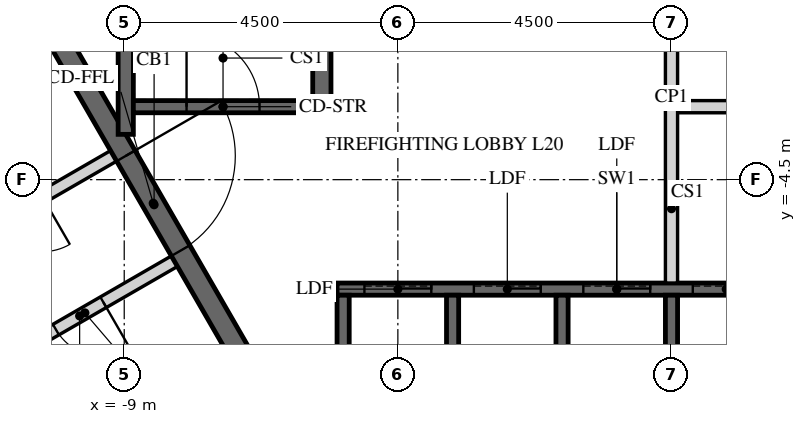
"""IFC4 building model, lengths in metres.
Left out: names, types, materials, properties, quantities, classifications, styles, units other than length and angle.
Written with IfcOpenShell. Run it as: python <this file> out.ifc"""

import sys

from ifc_helpers import new_model, si_unit, direction, frame, frame_2d, origin, place, context, subcontext, project, spatial, polyline, rectangle, outline, extrude, element, fill, save


model = new_model("IFC4")
c1 = context("Model", 3, precision=1e-05, world=origin(), true_north=direction((0.0, 1.0)))
c2 = subcontext(c1, "Body", "Model", "MODEL_VIEW")
j1 = project(units=[si_unit("LENGTHUNIT", "METRE"), si_unit("PLANEANGLEUNIT", "RADIAN")], contexts=[c1])
p1 = place(None, origin())
s1 = spatial("IfcSite", under=j1, at=p1, CompositionType="ELEMENT")
p2 = place(p1, origin())
s2 = spatial("IfcBuilding", under=s1, at=p2, CompositionType="ELEMENT")
p3 = place(p2, frame((0.0, 0.0, 92.1)))
s3 = spatial("IfcBuildingStorey", under=s2, at=p3, CompositionType="ELEMENT", Elevation=92.1)
p4 = place(p3, frame((-15.819, 0.0, -0.15), z_axis=(0.0, 0.0, 1.0), x_axis=(0.499999880136, -0.866025472988, 0.0)))
e1 = element("IfcWall", 1, at=p4, inside=s3, PredefinedType="SHEAR", context=c2, shape_type="SweptSolid", body=[
    extrude(outline(polyline([(-0.173, -0.3), (15.993, -0.3), (15.646, 0.3), (0.173, 0.3), (-0.173, -0.3)])), origin(), (0.0, 0.0, 1.0), 3.9),
])
p5 = place(p4, frame((6.981, 0.0, 0.15)))
e2 = element("IfcOpeningElement", 2, at=p5, cuts=e1, PredefinedType="OPENING", context=c2, shape_type="SweptSolid", body=[
    extrude(rectangle(XDim=1.8, YDim=2.4, at=frame_2d((0.9, 1.2))), frame((0.0, 0.31, 0.0), z_axis=(0.0, -1.0, 0.0), x_axis=(1.0, 0.0, 0.0)), (0.0, 0.0, 1.0), 0.62),
])
p6 = place(p3, frame((-11.345, 0.0, -0.15), z_axis=(0.0, 0.0, 1.0), x_axis=(0.499995046907, -0.866028263435, 0.0)))
e3 = element("IfcWall", 3, at=p6, inside=s3, PredefinedType="SHEAR", context=c2, shape_type="SweptSolid", body=[
    extrude(outline(polyline([(-0.101, -0.175), (11.446, -0.175), (11.244, 0.175), (0.101, 0.175), (-0.101, -0.175)])), origin(), (0.0, 0.0, 1.0), 3.9),
])
p7 = place(p6, frame((4.744, 0.0, 0.15)))
e4 = element("IfcOpeningElement", 4, at=p7, cuts=e3, PredefinedType="OPENING", context=c2, shape_type="SweptSolid", body=[
    extrude(rectangle(XDim=1.8, YDim=2.4, at=frame_2d((0.9, 1.2))), frame((0.0, 0.185, 0.0), z_axis=(0.0, -1.0, 0.0), x_axis=(1.0, 0.0, 0.0)), (0.0, 0.0, 1.0), 0.37),
])
p8 = place(p3, frame((-5.5, -6.3, -0.25), z_axis=(0.0, 0.0, 1.0), x_axis=(1.0, 0.0, 0.0)))
e5 = element("IfcWall", 5, at=p8, inside=s3, PredefinedType="SHEAR", context=c2, shape_type="SweptSolid", body=[
    extrude(rectangle(XDim=9.2, YDim=0.2, at=frame_2d((4.6, 0.0))), origin(), (0.0, 0.0, 1.0), 3.9),
])
p9 = place(p8, frame((0.45, 0.0, 0.25)))
e6 = element("IfcOpeningElement", 6, at=p9, cuts=e5, PredefinedType="OPENING", context=c2, shape_type="SweptSolid", body=[
    extrude(rectangle(XDim=1.1, YDim=2.1, at=frame_2d((0.55, 1.05))), frame((0.0, 0.11, 0.0), z_axis=(0.0, -1.0, 0.0), x_axis=(1.0, 0.0, 0.0)), (0.0, 0.0, 1.0), 0.22),
])
p10 = place(p8, frame((2.25, 0.0, 0.25)))
e7 = element("IfcOpeningElement", 7, at=p10, cuts=e5, PredefinedType="OPENING", context=c2, shape_type="SweptSolid", body=[
    extrude(rectangle(XDim=1.1, YDim=2.1, at=frame_2d((0.55, 1.05))), frame((0.0, 0.11, 0.0), z_axis=(0.0, -1.0, 0.0), x_axis=(1.0, 0.0, 0.0)), (0.0, 0.0, 1.0), 0.22),
])
p11 = place(p8, frame((4.05, 0.0, 0.25)))
e8 = element("IfcOpeningElement", 8, at=p11, cuts=e5, PredefinedType="OPENING", context=c2, shape_type="SweptSolid", body=[
    extrude(rectangle(XDim=1.1, YDim=2.1, at=frame_2d((0.55, 1.05))), frame((0.0, 0.11, 0.0), z_axis=(0.0, -1.0, 0.0), x_axis=(1.0, 0.0, 0.0)), (0.0, 0.0, 1.0), 0.22),
])
p12 = place(p8, frame((5.85, 0.0, 0.25)))
e9 = element("IfcOpeningElement", 9, at=p12, cuts=e5, PredefinedType="OPENING", context=c2, shape_type="SweptSolid", body=[
    extrude(rectangle(XDim=1.1, YDim=2.1, at=frame_2d((0.55, 1.05))), frame((0.0, 0.11, 0.0), z_axis=(0.0, -1.0, 0.0), x_axis=(1.0, 0.0, 0.0)), (0.0, 0.0, 1.0), 0.22),
])
p13 = place(p8, frame((7.65, 0.0, 0.25)))
e10 = element("IfcOpeningElement", 10, at=p13, cuts=e5, PredefinedType="OPENING", context=c2, shape_type="SweptSolid", body=[
    extrude(rectangle(XDim=1.1, YDim=2.1, at=frame_2d((0.55, 1.05))), frame((0.0, 0.11, 0.0), z_axis=(0.0, -1.0, 0.0), x_axis=(1.0, 0.0, 0.0)), (0.0, 0.0, 1.0), 0.22),
])
for number, where, z_axis, x_axis in (
    (11, (-5.4, -9.3, -0.25), (0.0, 0.0, 1.0), (0.0, 1.0, 0.0)),
    (12, (-3.6, -9.3, -0.25), (0.0, 0.0, 1.0), (0.0, 1.0, 0.0)),
    (13, (-1.8, -9.3, -0.25), (0.0, 0.0, 1.0), (0.0, 1.0, 0.0)),
    (14, (0.0, -9.3, -0.25), (0.0, 0.0, 1.0), (0.0, 1.0, 0.0)),
):
    element("IfcWall", number, at=place(p3, frame(where, z_axis=z_axis, x_axis=x_axis)), inside=s3, PredefinedType="SHEAR", context=c2, shape_type="SweptSolid", body=[
        extrude(rectangle(XDim=2.9, YDim=0.2, at=frame_2d((1.45, 0.0))), origin(), (0.0, 0.0, 1.0), 3.9),
    ])
p14 = place(p3, frame((0.1, -3.3, 0.0), z_axis=(0.0, 0.0, 1.0), x_axis=(1.0, 0.0, 0.0)))
e15 = element("IfcWall", 15, at=p14, inside=s3, PredefinedType="PARTITIONING", context=c2, shape_type="SweptSolid", body=[
    extrude(rectangle(XDim=5.5, YDim=0.2, at=frame_2d((2.75, 0.0))), origin(), (0.0, 0.0, 1.0), 3.65),
])
p15 = place(p14, frame((2.3, 0.0, 0.0)))
e16 = element("IfcOpeningElement", 16, at=p15, cuts=e15, PredefinedType="OPENING", context=c2, shape_type="SweptSolid", body=[
    extrude(rectangle(XDim=0.9, YDim=2.1, at=frame_2d((0.45, 1.05))), frame((0.0, 0.11, 0.0), z_axis=(0.0, -1.0, 0.0), x_axis=(1.0, 0.0, 0.0)), (0.0, 0.0, 1.0), 0.22),
])
p16 = place(p3, frame((0.0, -6.2, 0.0), z_axis=(0.0, 0.0, 1.0), x_axis=(0.0, 1.0, 0.0)))
e17 = element("IfcWall", 17, at=p16, inside=s3, PredefinedType="PARTITIONING", context=c2, shape_type="SweptSolid", body=[
    extrude(rectangle(XDim=6.1, YDim=0.2, at=frame_2d((3.05, 0.0))), origin(), (0.0, 0.0, 1.0), 3.65),
])
p17 = place(p3, frame((-8.175, -5.841, 0.0), z_axis=(0.0, 0.0, 1.0), x_axis=(-0.866020560687, -0.500008388397, 0.0)))
e18 = element("IfcWall", 18, at=p17, inside=s3, PredefinedType="PARTITIONING", context=c2, shape_type="SweptSolid", body=[
    extrude(rectangle(XDim=3.4, YDim=0.2, at=frame_2d((1.7, 0.0))), origin(), (0.0, 0.0, 1.0), 3.65),
])
p18 = place(p17, frame((1.35, 0.0, 0.0)))
e19 = element("IfcOpeningElement", 19, at=p18, cuts=e18, PredefinedType="OPENING", context=c2, shape_type="SweptSolid", body=[
    extrude(rectangle(XDim=0.9, YDim=2.1, at=frame_2d((0.45, 1.05))), frame((0.0, 0.11, 0.0), z_axis=(0.0, -1.0, 0.0), x_axis=(1.0, 0.0, 0.0)), (0.0, 0.0, 1.0), 0.22),
])
p19 = place(p3, frame((-9.175, -4.109, 0.0), z_axis=(0.0, 0.0, 1.0), x_axis=(-0.865989465428, -0.500062241894, 0.0)))
e20 = element("IfcWall", 20, at=p19, inside=s3, PredefinedType="PARTITIONING", context=c2, shape_type="SweptSolid", body=[
    extrude(rectangle(XDim=3.4, YDim=0.2, at=frame_2d((1.7, 0.0))), origin(), (0.0, 0.0, 1.0), 3.65),
])
p20 = place(p19, frame((1.351, 0.0, 0.0)))
e21 = element("IfcOpeningElement", 21, at=p20, cuts=e20, PredefinedType="OPENING", context=c2, shape_type="SweptSolid", body=[
    extrude(rectangle(XDim=0.9, YDim=2.1, at=frame_2d((0.45, 1.05))), frame((0.0, 0.11, 0.0), z_axis=(0.0, -1.0, 0.0), x_axis=(1.0, 0.0, 0.0)), (0.0, 0.0, 1.0), 0.22),
])
p21 = place(p3, frame((-5.75, -3.4, -0.25), z_axis=(0.0, 0.0, 1.0), x_axis=(0.0, 1.0, 0.0)))
e22 = element("IfcWall", 22, at=p21, inside=s3, PredefinedType="SHEAR", context=c2, shape_type="SweptSolid", body=[
    extrude(rectangle(XDim=6.8, YDim=0.3, at=frame_2d((3.4, 0.0))), origin(), (0.0, 0.0, 1.0), 3.9),
])
p22 = place(p3, frame((-8.975, -3.755, -0.25), z_axis=(0.0, 0.0, 1.0), x_axis=(0.0, 1.0, 0.0)))
e23 = element("IfcWall", 23, at=p22, inside=s3, PredefinedType="SHEAR", context=c2, shape_type="SweptSolid", body=[
    extrude(rectangle(XDim=7.51, YDim=0.25, at=frame_2d((3.755, 0.0))), origin(), (0.0, 0.0, 1.0), 3.9),
])
p23 = place(p3, frame((-8.85, -3.3, -0.25), z_axis=(0.0, 0.0, 1.0), x_axis=(1.0, 0.0, 0.0)))
e24 = element("IfcWall", 24, at=p23, inside=s3, PredefinedType="SHEAR", context=c2, shape_type="SweptSolid", body=[
    extrude(rectangle(XDim=2.95, YDim=0.2, at=frame_2d((1.475, 0.0))), origin(), (0.0, 0.0, 1.0), 3.9),
])
p24 = place(p23, frame((0.875, 0.0, 0.25)))
e25 = element("IfcOpeningElement", 25, at=p24, cuts=e24, PredefinedType="OPENING", context=c2, shape_type="SweptSolid", body=[
    extrude(rectangle(XDim=1.2, YDim=2.4, at=frame_2d((0.6, 1.2))), frame((0.0, 0.11, 0.0), z_axis=(0.0, -1.0, 0.0), x_axis=(1.0, 0.0, 0.0)), (0.0, 0.0, 1.0), 0.22),
])
p25 = place(p7, origin())
e26 = element("IfcDoor", 26, at=p25, inside=s3, OperationType="DOUBLE_DOOR_SINGLE_SWING", PredefinedType="DOOR", context=c2, shape_type="SweptSolid", body=[
    extrude(rectangle(XDim=1.8, YDim=2.4, at=frame_2d((0.9, 1.2))), frame((0.0, 0.025, 0.0), z_axis=(0.0, -1.0, 0.0), x_axis=(1.0, 0.0, 0.0)), (0.0, 0.0, 1.0), 0.05),
])
fill(e4, e26)
p26 = place(p18, origin())
e27 = element("IfcDoor", 27, at=p26, inside=s3, OperationType="SINGLE_SWING_LEFT", PredefinedType="DOOR", context=c2, shape_type="SweptSolid", body=[
    extrude(rectangle(XDim=0.9, YDim=2.1, at=frame_2d((0.45, 1.05))), frame((0.0, 0.025, 0.0), z_axis=(0.0, -1.0, 0.0), x_axis=(1.0, 0.0, 0.0)), (0.0, 0.0, 1.0), 0.05),
])
fill(e19, e27)
p27 = place(p24, origin())
e28 = element("IfcDoor", 28, at=p27, inside=s3, OperationType="SINGLE_SWING_LEFT", PredefinedType="DOOR", context=c2, shape_type="SweptSolid", body=[
    extrude(rectangle(XDim=1.2, YDim=2.4, at=frame_2d((0.6, 1.2))), frame((0.0, 0.025, 0.0), z_axis=(0.0, -1.0, 0.0), x_axis=(1.0, 0.0, 0.0)), (0.0, 0.0, 1.0), 0.05),
])
fill(e25, e28)
p28 = place(p9, origin())
e29 = element("IfcDoor", 29, at=p28, inside=s3, OperationType="SLIDING_TO_LEFT", PredefinedType="DOOR", context=c2, shape_type="SweptSolid", body=[
    extrude(rectangle(XDim=1.1, YDim=2.1, at=frame_2d((0.55, 1.05))), frame((0.0, 0.025, 0.0), z_axis=(0.0, -1.0, 0.0), x_axis=(1.0, 0.0, 0.0)), (0.0, 0.0, 1.0), 0.05),
])
fill(e6, e29)
p29 = place(p10, origin())
e30 = element("IfcDoor", 30, at=p29, inside=s3, OperationType="SLIDING_TO_LEFT", PredefinedType="DOOR", context=c2, shape_type="SweptSolid", body=[
    extrude(rectangle(XDim=1.1, YDim=2.1, at=frame_2d((0.55, 1.05))), frame((0.0, 0.025, 0.0), z_axis=(0.0, -1.0, 0.0), x_axis=(1.0, 0.0, 0.0)), (0.0, 0.0, 1.0), 0.05),
])
fill(e7, e30)
p30 = place(p11, origin())
e31 = element("IfcDoor", 31, at=p30, inside=s3, OperationType="SLIDING_TO_LEFT", PredefinedType="DOOR", context=c2, shape_type="SweptSolid", body=[
    extrude(rectangle(XDim=1.1, YDim=2.1, at=frame_2d((0.55, 1.05))), frame((0.0, 0.025, 0.0), z_axis=(0.0, -1.0, 0.0), x_axis=(1.0, 0.0, 0.0)), (0.0, 0.0, 1.0), 0.05),
])
fill(e8, e31)
p31 = place(p12, origin())
e32 = element("IfcDoor", 32, at=p31, inside=s3, OperationType="SLIDING_TO_LEFT", PredefinedType="DOOR", context=c2, shape_type="SweptSolid", body=[
    extrude(rectangle(XDim=1.1, YDim=2.1, at=frame_2d((0.55, 1.05))), frame((0.0, 0.025, 0.0), z_axis=(0.0, -1.0, 0.0), x_axis=(1.0, 0.0, 0.0)), (0.0, 0.0, 1.0), 0.05),
])
fill(e9, e32)
save(model, sys.argv[1])
